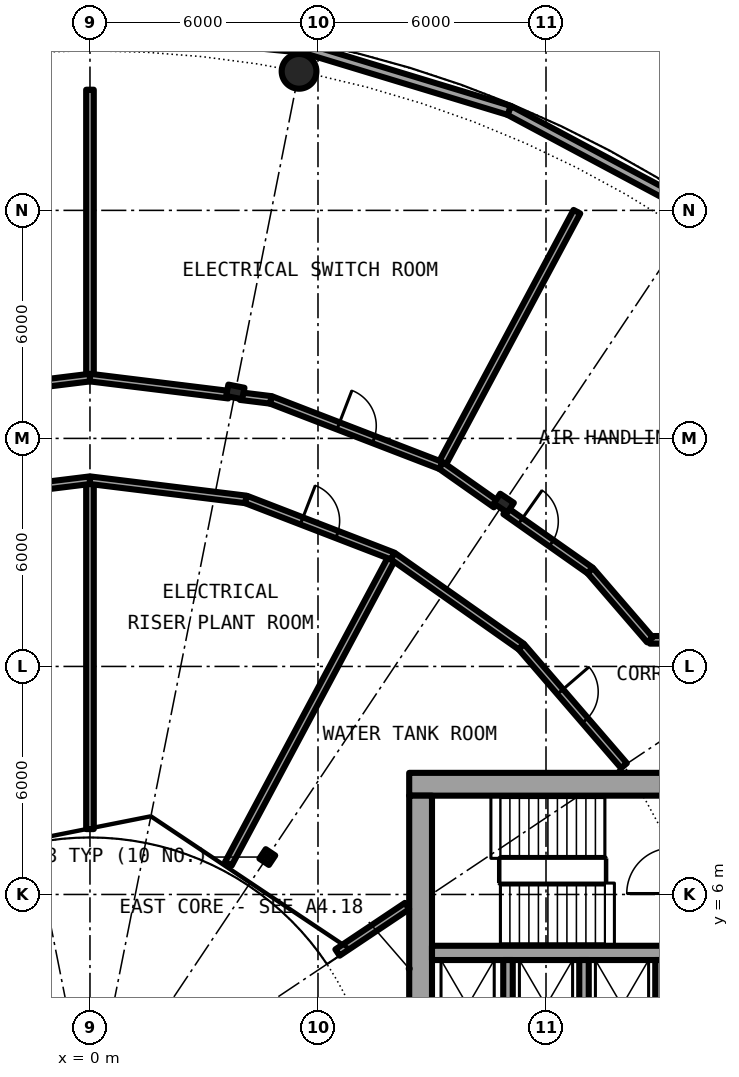
"""IFC4 building model, lengths in metres.
Left out: names, types, materials, properties, quantities, classifications, styles, units other than length and angle.
Written with IfcOpenShell. Run it as: python <this file> out.ifc"""

import sys

from ifc_helpers import new_model, si_unit, direction, frame, frame_2d, origin, origin_2d, place, context, subcontext, project, spatial, rectangle, hollow_circle, i_section, extrude, element, fill, save


model = new_model("IFC4")
c1 = context("Model", 3, precision=1e-05, world=origin(), true_north=direction((0.0, 1.0)))
c2 = subcontext(c1, "Body", "Model", "MODEL_VIEW")
j1 = project(units=[si_unit("LENGTHUNIT", "METRE"), si_unit("PLANEANGLEUNIT", "RADIAN")], contexts=[c1])
p1 = place(None, origin())
s1 = spatial("IfcSite", under=j1, at=p1, CompositionType="ELEMENT")
p2 = place(p1, origin())
s2 = spatial("IfcBuilding", under=s1, at=p2, CompositionType="ELEMENT")
p3 = place(p2, frame((0.0, 0.0, 103.25)))
s3 = spatial("IfcBuildingStorey", under=s2, at=p3, CompositionType="ELEMENT", Elevation=103.25)
p4 = place(p3, frame((5.501, 27.658, 0.0), z_axis=(0.0, 0.0, 1.0), x_axis=(1.0, 0.0, 0.0)))
e1 = element("IfcColumn", 1, at=p4, inside=s3, PredefinedType="COLUMN", context=c2, shape_type="SweptSolid", body=[
    extrude(hollow_circle(Radius=0.457, WallThickness=0.04, at=origin_2d()), origin(), (0.0, 0.0, 1.0), 4.2),
])
for number, where, z_axis, x_axis in (
    (2, (10.889, 16.297, 0.0), (0.0, 0.0, 1.0), (0.556, 0.831, 0.0)),
    (3, (3.824, 19.223, 0.0), (0.0, 0.0, 1.0), (0.195, 0.981, 0.0)),
):
    element("IfcColumn", number, at=place(p3, frame(where, z_axis=z_axis, x_axis=x_axis)), inside=s3, PredefinedType="COLUMN", context=c2, shape_type="SweptSolid", body=[
        extrude(i_section(OverallWidth=0.307, OverallDepth=0.432, WebThickness=0.021, FlangeThickness=0.04, FilletRadius=0.027, at=origin_2d()), origin(), (0.0, 0.0, 1.0), 4.2),
    ])
p5 = place(p3, frame((4.667, 6.984, 0.0), z_axis=(0.0, 0.0, 1.0), x_axis=(0.55557023302, 0.831469612303, 0.0)))
e4 = element("IfcColumn", 4, at=p5, inside=s3, PredefinedType="COLUMN", context=c2, shape_type="SweptSolid", body=[
    extrude(i_section(OverallWidth=0.3, OverallDepth=0.3, WebThickness=0.011, FlangeThickness=0.019, FilletRadius=0.027, at=origin_2d()), origin(), (0.0, 0.0, 1.0), 4.2),
])
p6 = place(p3, frame((16.014, 23.967, 0.0), z_axis=(0.0, 0.0, 1.0), x_axis=(-0.881874058161, 0.471485042756, 0.0)))
e5 = element("IfcWall", 5, at=p6, inside=s3, PredefinedType="SOLIDWALL", context=c2, shape_type="SweptSolid", body=[
    extrude(rectangle(XDim=5.65, YDim=0.25, at=frame_2d((2.825, 0.0))), origin(), (0.0, 0.0, 1.0), 3.85),
])
p7 = place(p3, frame((11.031, 26.631, 0.0), z_axis=(0.0, 0.0, 1.0), x_axis=(-0.956969521741, 0.29018844646, 0.0)))
e6 = element("IfcWall", 6, at=p7, inside=s3, PredefinedType="SOLIDWALL", context=c2, shape_type="SweptSolid", body=[
    extrude(rectangle(XDim=5.651, YDim=0.25, at=frame_2d((2.826, 0.0))), origin(), (0.0, 0.0, 1.0), 3.85),
])
for number, where, z_axis, x_axis in (
    (7, (5.623, 28.271, 0.0), (0.0, 0.0, 1.0), (-0.995, 0.098, 0.0)),
    (8, (0.0, 28.825, 0.0), (0.0, 0.0, 1.0), (-0.995, -0.098, 0.0)),
):
    element("IfcWall", number, at=place(p3, frame(where, z_axis=z_axis, x_axis=x_axis)), inside=s3, PredefinedType="SOLIDWALL", context=c2, shape_type="SweptSolid", body=[
        extrude(rectangle(XDim=5.65, YDim=0.25, at=frame_2d((2.825, 0.0))), origin(), (0.0, 0.0, 1.0), 3.85),
    ])
p8 = place(p3, frame((22.2, 8.9, 0.0), z_axis=(0.0, 0.0, 1.0), x_axis=(-1.0, 0.0, 0.0)))
e9 = element("IfcWall", 9, at=p8, inside=s3, PredefinedType="SHEAR", context=c2, shape_type="SweptSolid", body=[
    extrude(rectangle(XDim=13.8, YDim=0.6, at=frame_2d((6.9, 0.0))), origin(), (0.0, 0.0, 1.0), 4.2),
])
p9 = place(p8, frame((1.125, 0.0, 0.0)))
e10 = element("IfcOpeningElement", 10, at=p9, cuts=e9, PredefinedType="OPENING", context=c2, shape_type="SweptSolid", body=[
    extrude(rectangle(XDim=1.2, YDim=2.3, at=frame_2d((0.6, 1.15))), frame((0.0, 0.31, 0.0), z_axis=(0.0, -1.0, 0.0), x_axis=(1.0, 0.0, 0.0)), (0.0, 0.0, 1.0), 0.62),
])
p10 = place(p8, frame((3.15, 0.0, 0.0)))
e11 = element("IfcOpeningElement", 11, at=p10, cuts=e9, PredefinedType="OPENING", context=c2, shape_type="SweptSolid", body=[
    extrude(rectangle(XDim=1.2, YDim=2.3, at=frame_2d((0.6, 1.15))), frame((0.0, 0.31, 0.0), z_axis=(0.0, -1.0, 0.0), x_axis=(1.0, 0.0, 0.0)), (0.0, 0.0, 1.0), 0.62),
])
p11 = place(p3, frame((8.7, -8.6, 0.0), z_axis=(0.0, 0.0, 1.0), x_axis=(0.0, 1.0, 0.0)))
e12 = element("IfcWall", 12, at=p11, inside=s3, PredefinedType="SHEAR", context=c2, shape_type="SweptSolid", body=[
    extrude(rectangle(XDim=17.2, YDim=0.6, at=frame_2d((8.6, 0.0))), origin(), (0.0, 0.0, 1.0), 4.2),
])
p12 = place(p11, frame((7.4, 0.0, 0.1)))
e13 = element("IfcOpeningElement", 13, at=p12, cuts=e12, PredefinedType="OPENING", context=c2, shape_type="SweptSolid", body=[
    extrude(rectangle(XDim=2.4, YDim=2.2, at=frame_2d((1.2, 1.1))), frame((0.0, 0.31, 0.0), z_axis=(0.0, -1.0, 0.0), x_axis=(1.0, 0.0, 0.0)), (0.0, 0.0, 1.0), 0.62),
])
p13 = place(p3, frame((9.0, 4.462, 0.0), z_axis=(0.0, 0.0, 1.0), x_axis=(1.0, 0.0, 0.0)))
e14 = element("IfcWall", 14, at=p13, inside=s3, PredefinedType="SHEAR", context=c2, shape_type="SweptSolid", body=[
    extrude(rectangle(XDim=10.15, YDim=0.375, at=frame_2d((5.075, 0.0))), origin(), (0.0, 0.0, 1.0), 4.2),
])
p14 = place(p13, frame((6.6, 0.0, 0.0)))
e15 = element("IfcOpeningElement", 15, at=p14, cuts=e14, PredefinedType="OPENING", context=c2, shape_type="SweptSolid", body=[
    extrude(rectangle(XDim=1.1, YDim=2.3, at=frame_2d((0.55, 1.15))), frame((0.0, 0.198, 0.0), z_axis=(0.0, -1.0, 0.0), x_axis=(1.0, 0.0, 0.0)), (0.0, 0.0, 1.0), 0.395),
])
for number, where, z_axis, x_axis in (
    (16, (15.0, 1.825, 0.0), (0.0, 0.0, 1.0), (0.0, 1.0, 0.0)),
    (17, (11.0, 1.825, 0.0), (0.0, 0.0, 1.0), (0.0, 1.0, 0.0)),
    (18, (13.0, 1.825, 0.0), (0.0, 0.0, 1.0), (0.0, 1.0, 0.0)),
):
    element("IfcWall", number, at=place(p3, frame(where, z_axis=z_axis, x_axis=x_axis)), inside=s3, PredefinedType="SOLIDWALL", context=c2, shape_type="SweptSolid", body=[
        extrude(rectangle(XDim=2.45, YDim=0.25, at=frame_2d((1.225, 0.0))), origin(), (0.0, 0.0, 1.0), 3.85),
    ])
p15 = place(p3, frame((0.0, 7.72, 0.0), z_axis=(0.0, 0.0, 1.0), x_axis=(0.0, 1.0, 0.0)))
e19 = element("IfcWall", 19, at=p15, inside=s3, PredefinedType="PARTITIONING", context=c2, shape_type="SweptSolid", body=[
    extrude(rectangle(XDim=9.18, YDim=0.2, at=frame_2d((4.59, 0.0))), origin(), (0.0, 0.0, 1.0), 3.85),
])
p16 = place(p3, frame((0.0, 19.6, 0.0), z_axis=(0.0, 0.0, 1.0), x_axis=(0.0, 1.0, 0.0)))
e20 = element("IfcWall", 20, at=p16, inside=s3, PredefinedType="PARTITIONING", context=c2, shape_type="SweptSolid", body=[
    extrude(rectangle(XDim=7.575, YDim=0.2, at=frame_2d((3.788, 0.0))), origin(), (0.0, 0.0, 1.0), 3.85),
])
p17 = place(p3, frame((3.641, 6.807, 0.0), z_axis=(0.0, 0.0, 1.0), x_axis=(0.471428625665, 0.881904218667, 0.0)))
e21 = element("IfcWall", 21, at=p17, inside=s3, PredefinedType="PARTITIONING", context=c2, shape_type="SweptSolid", body=[
    extrude(rectangle(XDim=9.18, YDim=0.2, at=frame_2d((4.59, 0.0))), origin(), (0.0, 0.0, 1.0), 3.85),
])
p18 = place(p3, frame((9.242, 17.285, 0.0), z_axis=(0.0, 0.0, 1.0), x_axis=(0.471439510802, 0.881898399848, 0.0)))
e22 = element("IfcWall", 22, at=p18, inside=s3, PredefinedType="PARTITIONING", context=c2, shape_type="SweptSolid", body=[
    extrude(rectangle(XDim=7.575, YDim=0.2, at=frame_2d((3.787, 0.0))), origin(), (0.0, 0.0, 1.0), 3.85),
])
p19 = place(p3, frame((6.513, 4.472, 0.0), z_axis=(0.0, 0.0, 1.0), x_axis=(0.831333375071, 0.555774072347, 0.0)))
e23 = element("IfcWall", 23, at=p19, inside=s3, PredefinedType="PARTITIONING", context=c2, shape_type="SweptSolid", body=[
    extrude(rectangle(XDim=2.203, YDim=0.2, at=frame_2d((1.101, 0.0))), origin(), (0.0, 0.0, 1.0), 3.85),
])
p20 = place(p3, frame((14.735, 12.7, 0.0), z_axis=(0.0, 0.0, 1.0), x_axis=(1.0, 0.0, 0.0)))
e24 = element("IfcWall", 24, at=p20, inside=s3, PredefinedType="PARTITIONING", context=c2, shape_type="SweptSolid", body=[
    extrude(rectangle(XDim=7.165, YDim=0.2, at=frame_2d((3.583, 0.0))), origin(), (0.0, 0.0, 1.0), 3.85),
])
p21 = place(p20, frame((5.922, 0.0, 0.0)))
e25 = element("IfcOpeningElement", 25, at=p21, cuts=e24, PredefinedType="OPENING", context=c2, shape_type="SweptSolid", body=[
    extrude(rectangle(XDim=1.0, YDim=2.3, at=frame_2d((0.5, 1.15))), frame((0.0, 0.11, 0.0), z_axis=(0.0, -1.0, 0.0), x_axis=(1.0, 0.0, 0.0)), (0.0, 0.0, 1.0), 0.22),
])
for number, where, z_axis, x_axis in (
    (26, (-4.106, 16.394, 0.0), (0.0, 0.0, 1.0), (0.992, 0.122, 0.0)),
    (27, (0.0, 16.9, 0.0), (0.0, 0.0, 1.0), (0.992, -0.122, 0.0)),
):
    element("IfcWall", number, at=place(p3, frame(where, z_axis=z_axis, x_axis=x_axis)), inside=s3, PredefinedType="PARTITIONING", context=c2, shape_type="SweptSolid", body=[
        extrude(rectangle(XDim=4.137, YDim=0.2, at=frame_2d((2.068, 0.0))), origin(), (0.0, 0.0, 1.0), 3.85),
    ])
p22 = place(p3, frame((4.106, 16.394, 0.0), z_axis=(0.0, 0.0, 1.0), x_axis=(0.932943640288, -0.360022449363, 0.0)))
e28 = element("IfcWall", 28, at=p22, inside=s3, PredefinedType="PARTITIONING", context=c2, shape_type="SweptSolid", body=[
    extrude(rectangle(XDim=4.139, YDim=0.2, at=frame_2d((2.069, 0.0))), origin(), (0.0, 0.0, 1.0), 3.85),
])
p23 = place(p22, frame((1.569, 0.0, 0.0)))
e29 = element("IfcOpeningElement", 29, at=p23, cuts=e28, PredefinedType="OPENING", context=c2, shape_type="SweptSolid", body=[
    extrude(rectangle(XDim=1.0, YDim=2.3, at=frame_2d((0.5, 1.15))), frame((0.0, 0.11, 0.0), z_axis=(0.0, -1.0, 0.0), x_axis=(1.0, 0.0, 0.0)), (0.0, 0.0, 1.0), 0.22),
])
p24 = place(p3, frame((7.967, 14.904, 0.0), z_axis=(0.0, 0.0, 1.0), x_axis=(0.817567680547, -0.575832517079, 0.0)))
e30 = element("IfcWall", 30, at=p24, inside=s3, PredefinedType="PARTITIONING", context=c2, shape_type="SweptSolid", body=[
    extrude(rectangle(XDim=4.137, YDim=0.2, at=frame_2d((2.068, 0.0))), origin(), (0.0, 0.0, 1.0), 3.85),
])
p25 = place(p3, frame((11.349, 12.522, 0.0), z_axis=(0.0, 0.0, 1.0), x_axis=(0.653212695939, -0.757174467256, 0.0)))
e31 = element("IfcWall", 31, at=p25, inside=s3, PredefinedType="PARTITIONING", context=c2, shape_type="SweptSolid", body=[
    extrude(rectangle(XDim=4.138, YDim=0.2, at=frame_2d((2.069, 0.0))), origin(), (0.0, 0.0, 1.0), 3.85),
])
p26 = place(p25, frame((1.569, 0.0, 0.0)))
e32 = element("IfcOpeningElement", 32, at=p26, cuts=e31, PredefinedType="OPENING", context=c2, shape_type="SweptSolid", body=[
    extrude(rectangle(XDim=1.0, YDim=2.3, at=frame_2d((0.5, 1.15))), frame((0.0, 0.11, 0.0), z_axis=(0.0, -1.0, 0.0), x_axis=(1.0, 0.0, 0.0)), (0.0, 0.0, 1.0), 0.22),
])
for number, where, z_axis, x_axis in (
    (33, (-3.653, 19.15, 0.0), (0.0, 0.0, 1.0), (0.992, 0.122, 0.0)),
    (34, (0.0, 19.6, 0.0), (0.0, 0.0, 1.0), (0.992, -0.122, 0.0)),
):
    element("IfcWall", number, at=place(p3, frame(where, z_axis=z_axis, x_axis=x_axis)), inside=s3, PredefinedType="PARTITIONING", context=c2, shape_type="SweptSolid", body=[
        extrude(rectangle(XDim=3.681, YDim=0.2, at=frame_2d((1.84, 0.0))), origin(), (0.0, 0.0, 1.0), 3.54),
    ])
p27 = place(p3, frame((3.958, 19.112, 0.0), z_axis=(0.0, 0.0, 1.0), x_axis=(0.99248512894, -0.122365308943, 0.0)))
e35 = element("IfcWall", 35, at=p27, inside=s3, PredefinedType="PARTITIONING", context=c2, shape_type="SweptSolid", body=[
    extrude(rectangle(XDim=0.81, YDim=0.2, at=frame_2d((0.405, 0.0))), origin(), (0.0, 0.0, 1.0), 3.54),
])
p28 = place(p3, frame((4.762, 19.013, 0.0), z_axis=(0.0, 0.0, 1.0), x_axis=(0.932988479706, -0.359906233255, 0.0)))
e36 = element("IfcWall", 36, at=p28, inside=s3, PredefinedType="PARTITIONING", context=c2, shape_type="SweptSolid", body=[
    extrude(rectangle(XDim=4.799, YDim=0.2, at=frame_2d((2.399, 0.0))), origin(), (0.0, 0.0, 1.0), 3.54),
])
p29 = place(p28, frame((1.899, 0.0, 0.0)))
e37 = element("IfcOpeningElement", 37, at=p29, cuts=e36, PredefinedType="OPENING", context=c2, shape_type="SweptSolid", body=[
    extrude(rectangle(XDim=1.0, YDim=2.3, at=frame_2d((0.5, 1.15))), frame((0.0, 0.11, 0.0), z_axis=(0.0, -1.0, 0.0), x_axis=(1.0, 0.0, 0.0)), (0.0, 0.0, 1.0), 0.22),
])
p30 = place(p3, frame((9.239, 17.286, 0.0), z_axis=(0.0, 0.0, 1.0), x_axis=(0.817743843048, -0.575582320052, 0.0)))
e38 = element("IfcWall", 38, at=p30, inside=s3, PredefinedType="PARTITIONING", context=c2, shape_type="SweptSolid", body=[
    extrude(rectangle(XDim=1.768, YDim=0.2, at=frame_2d((0.884, 0.0))), origin(), (0.0, 0.0, 1.0), 3.54),
])
p31 = place(p3, frame((10.936, 16.091, 0.0), z_axis=(0.0, 0.0, 1.0), x_axis=(0.817645456482, -0.575722074872, 0.0)))
e39 = element("IfcWall", 39, at=p31, inside=s3, PredefinedType="PARTITIONING", context=c2, shape_type="SweptSolid", body=[
    extrude(rectangle(XDim=2.724, YDim=0.2, at=frame_2d((1.362, 0.0))), origin(), (0.0, 0.0, 1.0), 3.54),
])
p32 = place(p31, frame((0.474, 0.0, 0.0)))
e40 = element("IfcOpeningElement", 40, at=p32, cuts=e39, PredefinedType="OPENING", context=c2, shape_type="SweptSolid", body=[
    extrude(rectangle(XDim=1.0, YDim=2.3, at=frame_2d((0.5, 1.15))), frame((0.0, 0.11, 0.0), z_axis=(0.0, -1.0, 0.0), x_axis=(1.0, 0.0, 0.0)), (0.0, 0.0, 1.0), 0.22),
])
p33 = place(p3, frame((13.163, 14.523, 0.0), z_axis=(0.0, 0.0, 1.0), x_axis=(0.653051967032, -0.757313097969, 0.0)))
e41 = element("IfcWall", 41, at=p33, inside=s3, PredefinedType="PARTITIONING", context=c2, shape_type="SweptSolid", body=[
    extrude(rectangle(XDim=2.407, YDim=0.2, at=frame_2d((1.204, 0.0))), origin(), (0.0, 0.0, 1.0), 3.85),
])
p34 = place(p32, origin())
e42 = element("IfcDoor", 42, at=p34, inside=s3, OperationType="SINGLE_SWING_LEFT", PredefinedType="DOOR", context=c2, shape_type="SweptSolid", body=[
    extrude(rectangle(XDim=1.0, YDim=2.3, at=frame_2d((0.5, 1.15))), frame((0.0, 0.025, 0.0), z_axis=(0.0, -1.0, 0.0), x_axis=(1.0, 0.0, 0.0)), (0.0, 0.0, 1.0), 0.05),
])
fill(e40, e42)
p35 = place(p29, origin())
e43 = element("IfcDoor", 43, at=p35, inside=s3, OperationType="SINGLE_SWING_RIGHT", PredefinedType="DOOR", context=c2, shape_type="SweptSolid", body=[
    extrude(rectangle(XDim=1.0, YDim=2.3, at=frame_2d((0.5, 1.15))), frame((0.0, 0.025, 0.0), z_axis=(0.0, -1.0, 0.0), x_axis=(1.0, 0.0, 0.0)), (0.0, 0.0, 1.0), 0.05),
])
fill(e37, e43)
p36 = place(p26, origin())
e44 = element("IfcDoor", 44, at=p36, inside=s3, OperationType="SINGLE_SWING_LEFT", PredefinedType="DOOR", context=c2, shape_type="SweptSolid", body=[
    extrude(rectangle(XDim=1.0, YDim=2.3, at=frame_2d((0.5, 1.15))), frame((0.0, 0.025, 0.0), z_axis=(0.0, -1.0, 0.0), x_axis=(1.0, 0.0, 0.0)), (0.0, 0.0, 1.0), 0.05),
])
fill(e32, e44)
p37 = place(p23, origin())
e45 = element("IfcDoor", 45, at=p37, inside=s3, OperationType="SINGLE_SWING_LEFT", PredefinedType="DOOR", context=c2, shape_type="SweptSolid", body=[
    extrude(rectangle(XDim=1.0, YDim=2.3, at=frame_2d((0.5, 1.15))), frame((0.0, 0.025, 0.0), z_axis=(0.0, -1.0, 0.0), x_axis=(1.0, 0.0, 0.0)), (0.0, 0.0, 1.0), 0.05),
])
fill(e29, e45)
save(model, sys.argv[1])
